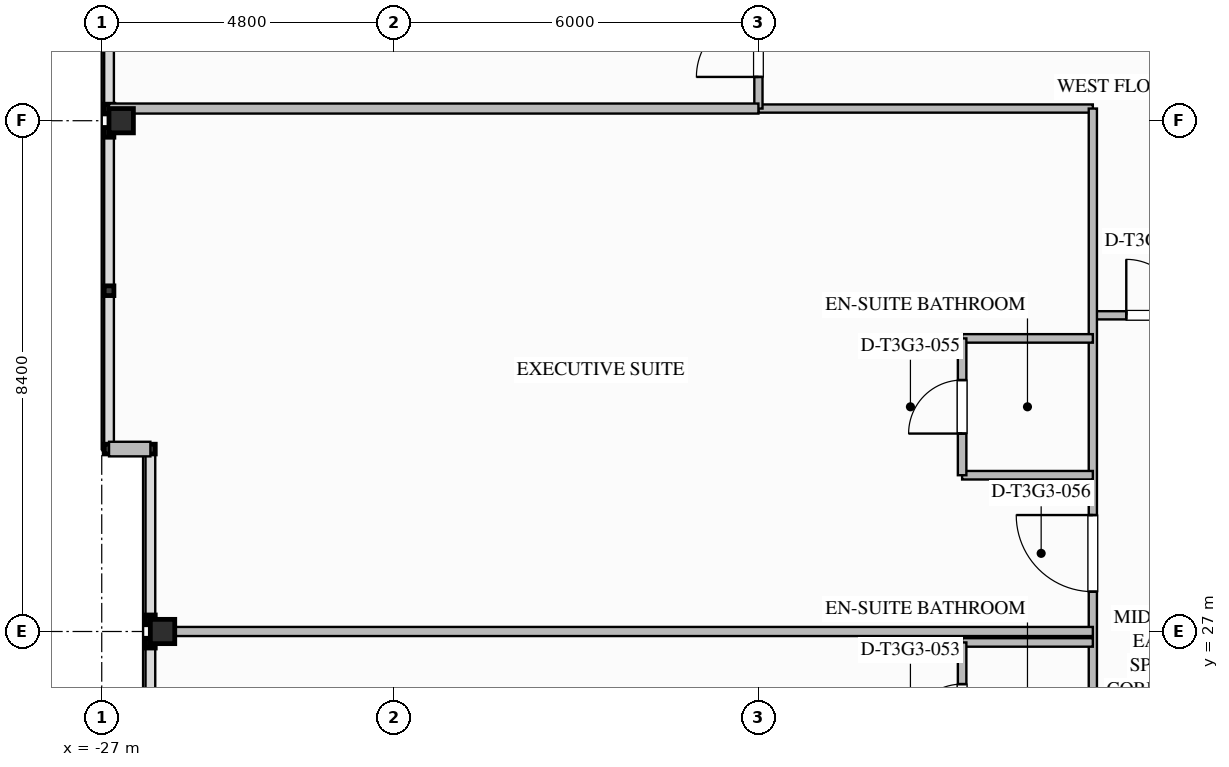
"""IFC4 building model, lengths in metres.
Left out: names, types, materials, properties, quantities, classifications, styles, units other than length and angle.
Written with IfcOpenShell. Run it as: python <this file> out.ifc"""

import sys

from ifc_helpers import new_model, si_unit, direction, frame, frame_2d, origin, origin_2d, place, context, subcontext, project, spatial, rectangle, i_section, extrude, element, fill, save


model = new_model("IFC4")
c1 = context("Model", 3, precision=1e-05, world=origin(), true_north=direction((0.0, 1.0)))
c2 = subcontext(c1, "Body", "Model", "MODEL_VIEW")
j1 = project(units=[si_unit("LENGTHUNIT", "METRE"), si_unit("PLANEANGLEUNIT", "RADIAN")], contexts=[c1])
p1 = place(None, origin())
s1 = spatial("IfcSite", under=j1, at=p1, CompositionType="ELEMENT")
p2 = place(p1, origin())
s2 = spatial("IfcBuilding", under=s1, at=p2, CompositionType="ELEMENT")
p3 = place(p2, frame((0.0, 0.0, 178.8)))
s3 = spatial("IfcBuildingStorey", under=s2, at=p3, CompositionType="ELEMENT", Elevation=178.8)
for number, where, z_axis, x_axis in (
    (1, (-26.0, 27.0, 0.0), (0.0, 0.0, 1.0), (1.0, 0.0, 0.0)),
    (2, (-26.68, 35.4, 0.0), (0.0, 0.0, 1.0), (1.0, 0.0, 0.0)),
):
    element("IfcColumn", number, at=place(p3, frame(where, z_axis=z_axis, x_axis=x_axis)), inside=s3, PredefinedType="COLUMN", context=c2, shape_type="SweptSolid", body=[
        extrude(i_section(OverallWidth=0.401, OverallDepth=0.399, WebThickness=0.025, FlangeThickness=0.04, FilletRadius=0.025, at=origin_2d()), origin(), (0.0, 0.0, 1.0), 3.547),
    ])
p4 = place(p3, frame((-26.2, 30.0, 0.0), z_axis=(0.0, 0.0, 1.0), x_axis=(-1.0, 0.0, 0.0)))
e3 = element("IfcWall", 3, at=p4, inside=s3, PredefinedType="STANDARD", context=c2, shape_type="SweptSolid", body=[
    extrude(rectangle(XDim=0.68, YDim=0.24, at=frame_2d((0.34, 0.0))), origin(), (0.0, 0.0, 1.0), 3.29),
])
p5 = place(p3, frame((-10.7, 32.2, 0.0), z_axis=(0.0, 0.0, 1.0), x_axis=(1.0, 0.0, 0.0)))
e4 = element("IfcWall", 4, at=p5, inside=s3, PredefinedType="PARTITIONING", context=c2, shape_type="SweptSolid", body=[
    extrude(rectangle(XDim=2.1, YDim=0.135, at=frame_2d((1.05, 0.0))), origin(), (0.0, 0.0, 1.0), 3.29),
])
p6 = place(p5, frame((0.55, 0.0, 0.0)))
e5 = element("IfcOpeningElement", 5, at=p6, cuts=e4, PredefinedType="OPENING", context=c2, shape_type="SweptSolid", body=[
    extrude(rectangle(XDim=0.92, YDim=2.1, at=frame_2d((0.46, 1.05))), frame((0.0, 0.077, 0.0), z_axis=(0.0, -1.0, 0.0), x_axis=(1.0, 0.0, 0.0)), (0.0, 0.0, 1.0), 0.155),
])
p7 = place(p3, frame((-16.2, 35.6, 0.0), z_axis=(0.0, 0.0, 1.0), x_axis=(1.0, 0.0, 0.0)))
e6 = element("IfcWall", 6, at=p7, inside=s3, PredefinedType="PARTITIONING", context=c2, shape_type="SweptSolid", body=[
    extrude(rectangle(XDim=5.5, YDim=0.135, at=frame_2d((2.75, 0.0))), origin(), (0.0, 0.0, 1.0), 2.667),
])
p8 = place(p3, frame((-10.7, 18.4, 0.0), z_axis=(0.0, 0.0, 1.0), x_axis=(0.0, 1.0, 0.0)))
e7 = element("IfcWall", 7, at=p8, inside=s3, PredefinedType="PARTITIONING", context=c2, shape_type="SweptSolid", body=[
    extrude(rectangle(XDim=17.2, YDim=0.135, at=frame_2d((8.6, 0.0))), origin(), (0.0, 0.0, 1.0), 3.29),
])
p9 = place(p8, frame((4.255, 0.0, 0.0)))
e8 = element("IfcOpeningElement", 8, at=p9, cuts=e7, PredefinedType="OPENING", context=c2, shape_type="SweptSolid", body=[
    extrude(rectangle(XDim=1.26, YDim=2.2, at=frame_2d((0.63, 1.1))), frame((0.0, 0.077, 0.0), z_axis=(0.0, -1.0, 0.0), x_axis=(1.0, 0.0, 0.0)), (0.0, 0.0, 1.0), 0.155),
])
p10 = place(p8, frame((9.255, 0.0, 0.0)))
e9 = element("IfcOpeningElement", 9, at=p10, cuts=e7, PredefinedType="OPENING", context=c2, shape_type="SweptSolid", body=[
    extrude(rectangle(XDim=1.26, YDim=2.2, at=frame_2d((0.63, 1.1))), frame((0.0, 0.077, 0.0), z_axis=(0.0, -1.0, 0.0), x_axis=(1.0, 0.0, 0.0)), (0.0, 0.0, 1.0), 0.155),
])
p11 = place(p3, frame((-16.2, 35.6, 0.0), z_axis=(0.0, 0.0, 1.0), x_axis=(0.0, 1.0, 0.0)))
e10 = element("IfcWall", 10, at=p11, inside=s3, PredefinedType="PARTITIONING", context=c2, shape_type="SweptSolid", body=[
    extrude(rectangle(XDim=2.1, YDim=0.135, at=frame_2d((1.05, 0.0))), origin(), (0.0, 0.0, 1.0), 2.58),
])
p12 = place(p11, frame((0.52, 0.0, 0.0)))
e11 = element("IfcOpeningElement", 11, at=p12, cuts=e10, PredefinedType="OPENING", context=c2, shape_type="SweptSolid", body=[
    extrude(rectangle(XDim=1.02, YDim=2.15, at=frame_2d((0.51, 1.075))), frame((0.0, 0.077, 0.0), z_axis=(0.0, -1.0, 0.0), x_axis=(1.0, 0.0, 0.0)), (0.0, 0.0, 1.0), 0.155),
])
p13 = place(p3, frame((-26.88, 35.6, 0.0), z_axis=(0.0, 0.0, 1.0), x_axis=(1.0, 0.0, 0.0)))
e12 = element("IfcWall", 12, at=p13, inside=s3, PredefinedType="PARTITIONING", context=c2, shape_type="SweptSolid", body=[
    extrude(rectangle(XDim=10.68, YDim=0.165, at=frame_2d((5.34, 0.0))), origin(), (0.0, 0.0, 1.0), 2.58),
])
p14 = place(p3, frame((-26.2, 27.0, 0.0), z_axis=(0.0, 0.0, 1.0), x_axis=(1.0, 0.0, 0.0)))
e13 = element("IfcWall", 13, at=p14, inside=s3, PredefinedType="PARTITIONING", context=c2, shape_type="SweptSolid", body=[
    extrude(rectangle(XDim=15.5, YDim=0.15, at=frame_2d((7.75, 0.0))), origin(), (0.0, 0.0, 1.0), 2.58),
])
p15 = place(p3, frame((-10.7, 26.82, 0.0), z_axis=(0.0, 0.0, 1.0), x_axis=(-1.0, 0.0, 0.0)))
e14 = element("IfcWall", 14, at=p15, inside=s3, PredefinedType="PLUMBINGWALL", context=c2, shape_type="SweptSolid", body=[
    extrude(rectangle(XDim=2.15, YDim=0.14, at=frame_2d((1.075, 0.0))), origin(), (0.0, 0.0, 1.0), 2.667),
])
p16 = place(p3, frame((-12.85, 24.57, 0.0), z_axis=(0.0, 0.0, 1.0), x_axis=(0.0, 1.0, 0.0)))
e15 = element("IfcWall", 15, at=p16, inside=s3, PredefinedType="PLUMBINGWALL", context=c2, shape_type="SweptSolid", body=[
    extrude(rectangle(XDim=2.25, YDim=0.14, at=frame_2d((1.125, 0.0))), origin(), (0.0, 0.0, 1.0), 3.29),
])
p17 = place(p16, frame((0.685, 0.0, 0.0)))
e16 = element("IfcOpeningElement", 16, at=p17, cuts=e15, PredefinedType="OPENING", context=c2, shape_type="SweptSolid", body=[
    extrude(rectangle(XDim=0.88, YDim=2.1, at=frame_2d((0.44, 1.05))), frame((0.0, 0.08, 0.0), z_axis=(0.0, -1.0, 0.0), x_axis=(1.0, 0.0, 0.0)), (0.0, 0.0, 1.0), 0.16),
])
for number, where, z_axis, x_axis in (
    (17, (-10.7, 29.57, 0.0), (0.0, 0.0, 1.0), (-1.0, 0.0, 0.0)),
    (18, (-10.7, 31.82, 0.0), (0.0, 0.0, 1.0), (-1.0, 0.0, 0.0)),
):
    element("IfcWall", number, at=place(p3, frame(where, z_axis=z_axis, x_axis=x_axis)), inside=s3, PredefinedType="PLUMBINGWALL", context=c2, shape_type="SweptSolid", body=[
        extrude(rectangle(XDim=2.15, YDim=0.14, at=frame_2d((1.075, 0.0))), origin(), (0.0, 0.0, 1.0), 3.29),
    ])
p18 = place(p3, frame((-12.85, 29.57, 0.0), z_axis=(0.0, 0.0, 1.0), x_axis=(0.0, 1.0, 0.0)))
e19 = element("IfcWall", 19, at=p18, inside=s3, PredefinedType="PLUMBINGWALL", context=c2, shape_type="SweptSolid", body=[
    extrude(rectangle(XDim=2.25, YDim=0.14, at=frame_2d((1.125, 0.0))), origin(), (0.0, 0.0, 1.0), 3.29),
])
p19 = place(p18, frame((0.685, 0.0, 0.0)))
e20 = element("IfcOpeningElement", 20, at=p19, cuts=e19, PredefinedType="OPENING", context=c2, shape_type="SweptSolid", body=[
    extrude(rectangle(XDim=0.88, YDim=2.1, at=frame_2d((0.44, 1.05))), frame((0.0, 0.08, 0.0), z_axis=(0.0, -1.0, 0.0), x_axis=(1.0, 0.0, 0.0)), (0.0, 0.0, 1.0), 0.16),
])
p20 = place(p6, origin())
e21 = element("IfcDoor", 21, at=p20, inside=s3, OperationType="SINGLE_SWING_LEFT", PredefinedType="DOOR", context=c2, shape_type="SweptSolid", body=[
    extrude(rectangle(XDim=0.92, YDim=2.1, at=frame_2d((0.46, 1.05))), frame((0.0, 0.025, 0.0), z_axis=(0.0, -1.0, 0.0), x_axis=(1.0, 0.0, 0.0)), (0.0, 0.0, 1.0), 0.05),
])
fill(e5, e21)
p21 = place(p12, origin())
e22 = element("IfcDoor", 22, at=p21, inside=s3, OperationType="SINGLE_SWING_LEFT", PredefinedType="DOOR", context=c2, shape_type="SweptSolid", body=[
    extrude(rectangle(XDim=1.02, YDim=2.15, at=frame_2d((0.51, 1.075))), frame((0.0, 0.025, 0.0), z_axis=(0.0, -1.0, 0.0), x_axis=(1.0, 0.0, 0.0)), (0.0, 0.0, 1.0), 0.05),
])
fill(e11, e22)
p22 = place(p17, origin())
e23 = element("IfcDoor", 23, at=p22, inside=s3, OperationType="SINGLE_SWING_LEFT", PredefinedType="DOOR", context=c2, shape_type="SweptSolid", body=[
    extrude(rectangle(XDim=0.88, YDim=2.1, at=frame_2d((0.44, 1.05))), frame((0.0, 0.025, 0.0), z_axis=(0.0, -1.0, 0.0), x_axis=(1.0, 0.0, 0.0)), (0.0, 0.0, 1.0), 0.05),
])
fill(e16, e23)
p23 = place(p19, origin())
e24 = element("IfcDoor", 24, at=p23, inside=s3, OperationType="SINGLE_SWING_LEFT", PredefinedType="DOOR", context=c2, shape_type="SweptSolid", body=[
    extrude(rectangle(XDim=0.88, YDim=2.1, at=frame_2d((0.44, 1.05))), frame((0.0, 0.025, 0.0), z_axis=(0.0, -1.0, 0.0), x_axis=(1.0, 0.0, 0.0)), (0.0, 0.0, 1.0), 0.05),
])
fill(e20, e24)
p24 = place(p10, origin())
e25 = element("IfcDoor", 25, at=p24, inside=s3, OperationType="SINGLE_SWING_RIGHT", PredefinedType="DOOR", context=c2, shape_type="SweptSolid", body=[
    extrude(rectangle(XDim=1.26, YDim=2.2, at=frame_2d((0.63, 1.1))), frame((0.0, 0.025, 0.0), z_axis=(0.0, -1.0, 0.0), x_axis=(1.0, 0.0, 0.0)), (0.0, 0.0, 1.0), 0.05),
])
fill(e9, e25)
save(model, sys.argv[1])
